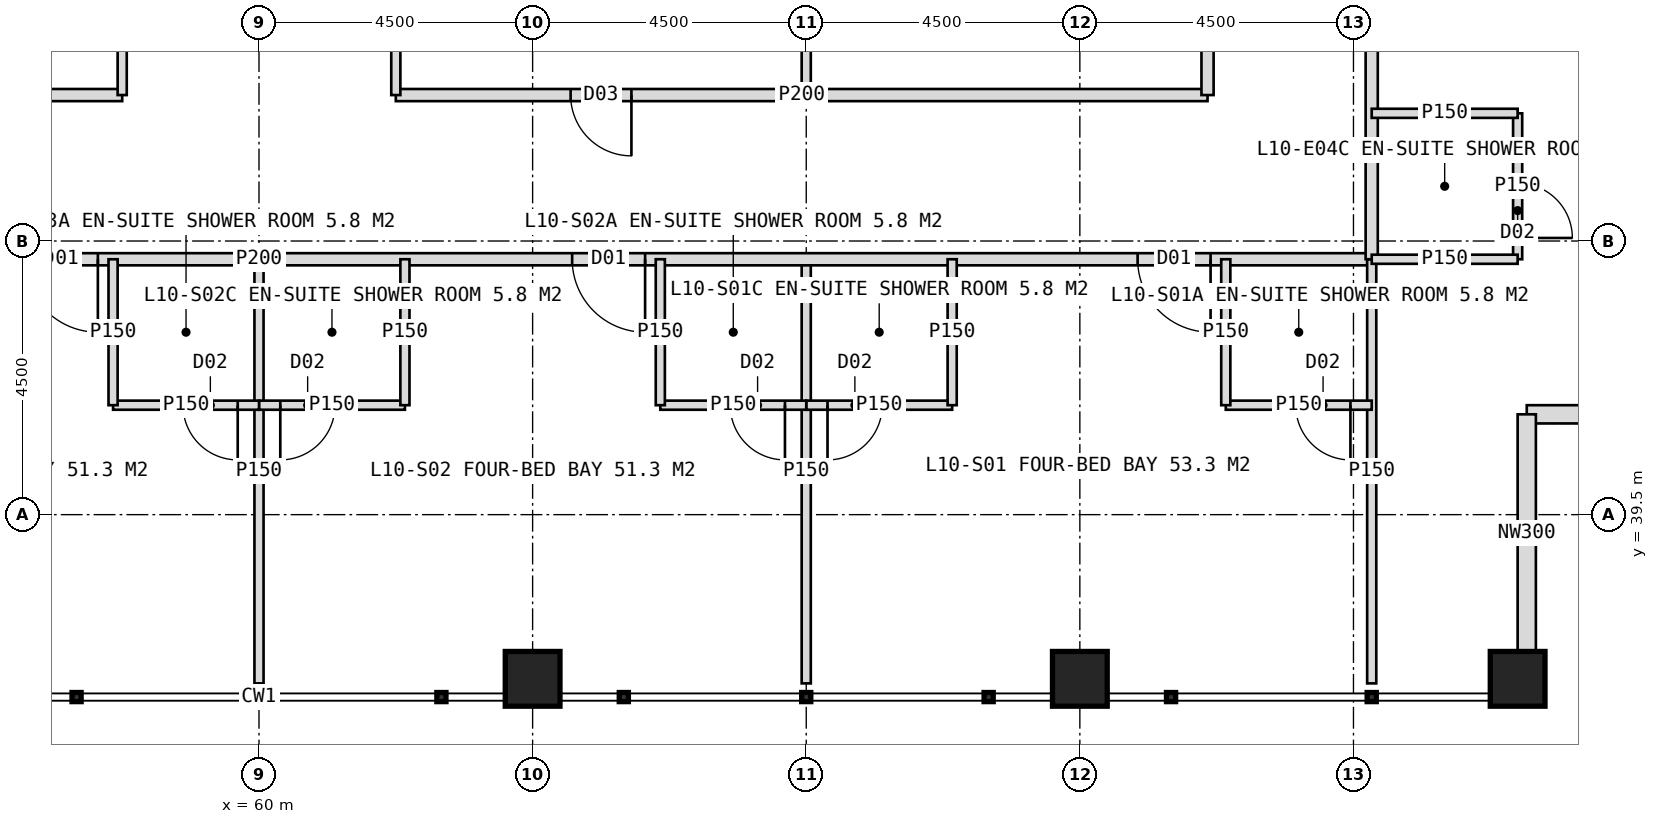
"""IFC4 building model, lengths in metres.
Left out: names, types, materials, properties, quantities, classifications, styles, units other than length and angle.
Written with IfcOpenShell. Run it as: python <this file> out.ifc"""

import sys

from ifc_helpers import new_model, si_unit, direction, frame, frame_2d, origin, origin_2d, place, context, subcontext, project, spatial, rectangle, hollow_rectangle, extrude, element, fill, save


model = new_model("IFC4")
c1 = context("Model", 3, precision=1e-05, world=origin(), true_north=direction((0.0, 1.0)))
c2 = subcontext(c1, "Body", "Model", "MODEL_VIEW")
j1 = project(units=[si_unit("LENGTHUNIT", "METRE"), si_unit("PLANEANGLEUNIT", "RADIAN")], contexts=[c1])
p1 = place(None, origin())
s1 = spatial("IfcSite", under=j1, at=p1, CompositionType="ELEMENT")
p2 = place(p1, origin())
s2 = spatial("IfcBuilding", under=s1, at=p2, CompositionType="ELEMENT")
p3 = place(p2, frame((0.0, 0.0, 47.0)))
s3 = spatial("IfcBuildingStorey", under=s2, at=p3, CompositionType="ELEMENT", Elevation=47.0)
for number, where, z_axis, x_axis in (
    (1, (64.5, 36.8, 0.0), (0.0, 0.0, 1.0), (1.0, 0.0, 0.0)),
    (2, (73.5, 36.8, 0.0), (0.0, 0.0, 1.0), (1.0, 0.0, 0.0)),
    (3, (80.7, 36.8, 0.0), (0.0, 0.0, 1.0), (1.0, 0.0, 0.0)),
):
    element("IfcColumn", number, at=place(p3, frame(where, z_axis=z_axis, x_axis=x_axis)), inside=s3, PredefinedType="COLUMN", context=c2, shape_type="SweptSolid", body=[
        extrude(hollow_rectangle(XDim=0.9, YDim=0.9, WallThickness=0.08, at=origin_2d()), origin(), (0.0, 0.0, 1.0), 4.0),
    ])
for number, where, z_axis, x_axis in (
    (4, (84.75, 41.15, 0.0), (0.0, 0.0, 1.0), (-1.0, 0.0, 0.0)),
    (5, (80.85, 41.15, 0.0), (0.0, 0.0, 1.0), (0.0, -1.0, 0.0)),
):
    element("IfcWall", number, at=place(p3, frame(where, z_axis=z_axis, x_axis=x_axis)), inside=s3, PredefinedType="ELEMENTEDWALL", context=c2, shape_type="SweptSolid", body=[
        extrude(rectangle(XDim=3.9, YDim=0.3, at=frame_2d((1.95, 0.0))), origin(), (0.0, 0.0, 1.0), 2.95),
    ])
p4 = place(p3, frame((69.0, 43.7, 0.0), z_axis=(0.0, 0.0, 1.0), x_axis=(0.0, -1.0, 0.0)))
e6 = element("IfcWall", 6, at=p4, inside=s3, PredefinedType="PARTITIONING", context=c2, shape_type="SweptSolid", body=[
    extrude(rectangle(XDim=6.975, YDim=0.15, at=frame_2d((3.487, 0.0))), origin(), (0.0, 0.0, 1.0), 3.75),
])
p5 = place(p3, frame((60.0, 43.7, 0.0), z_axis=(0.0, 0.0, 1.0), x_axis=(0.0, -1.0, 0.0)))
e7 = element("IfcWall", 7, at=p5, inside=s3, PredefinedType="PARTITIONING", context=c2, shape_type="SweptSolid", body=[
    extrude(rectangle(XDim=6.975, YDim=0.15, at=frame_2d((3.487, 0.0))), origin(), (0.0, 0.0, 1.0), 2.75),
])
p6 = place(p3, frame((78.3, 43.7, 0.0), z_axis=(0.0, 0.0, 1.0), x_axis=(-1.0, 0.0, 0.0)))
e8 = element("IfcWall", 8, at=p6, inside=s3, PredefinedType="PARTITIONING", context=c2, shape_type="SweptSolid", body=[
    extrude(rectangle(XDim=36.6, YDim=0.2, at=frame_2d((18.3, 0.0))), origin(), (0.0, 0.0, 1.0), 3.75),
])
p7 = place(p6, frame((2.65, 0.0, 0.0)))
e9 = element("IfcOpeningElement", 9, at=p7, cuts=e8, PredefinedType="OPENING", context=c2, shape_type="SweptSolid", body=[
    extrude(rectangle(XDim=1.2, YDim=2.2, at=frame_2d((0.6, 1.1))), frame((0.0, 0.11, 0.0), z_axis=(0.0, -1.0, 0.0), x_axis=(1.0, 0.0, 0.0)), (0.0, 0.0, 1.0), 0.22),
])
p8 = place(p6, frame((11.95, 0.0, 0.0)))
e10 = element("IfcOpeningElement", 10, at=p8, cuts=e8, PredefinedType="OPENING", context=c2, shape_type="SweptSolid", body=[
    extrude(rectangle(XDim=1.2, YDim=2.2, at=frame_2d((0.6, 1.1))), frame((0.0, 0.11, 0.0), z_axis=(0.0, -1.0, 0.0), x_axis=(1.0, 0.0, 0.0)), (0.0, 0.0, 1.0), 0.22),
])
p9 = place(p6, frame((20.95, 0.0, 0.0)))
e11 = element("IfcOpeningElement", 11, at=p9, cuts=e8, PredefinedType="OPENING", context=c2, shape_type="SweptSolid", body=[
    extrude(rectangle(XDim=1.2, YDim=2.2, at=frame_2d((0.6, 1.1))), frame((0.0, 0.11, 0.0), z_axis=(0.0, -1.0, 0.0), x_axis=(1.0, 0.0, 0.0)), (0.0, 0.0, 1.0), 0.22),
])
p10 = place(p6, frame((29.95, 0.0, 0.0)))
e12 = element("IfcOpeningElement", 12, at=p10, cuts=e8, PredefinedType="OPENING", context=c2, shape_type="SweptSolid", body=[
    extrude(rectangle(XDim=1.2, YDim=2.2, at=frame_2d((0.6, 1.1))), frame((0.0, 0.11, 0.0), z_axis=(0.0, -1.0, 0.0), x_axis=(1.0, 0.0, 0.0)), (0.0, 0.0, 1.0), 0.22),
])
p11 = place(p3, frame((78.3, 43.7, 0.0), z_axis=(0.0, 0.0, 1.0), x_axis=(0.0, -1.0, 0.0)))
e13 = element("IfcWall", 13, at=p11, inside=s3, PredefinedType="PARTITIONING", context=c2, shape_type="SweptSolid", body=[
    extrude(rectangle(XDim=6.975, YDim=0.15, at=frame_2d((3.487, 0.0))), origin(), (0.0, 0.0, 1.0), 3.75),
])
p12 = place(p3, frame((78.3, 41.3, 0.0), z_axis=(0.0, 0.0, 1.0), x_axis=(-1.0, 0.0, 0.0)))
e14 = element("IfcWall", 14, at=p12, inside=s3, PredefinedType="PARTITIONING", context=c2, shape_type="SweptSolid", body=[
    extrude(rectangle(XDim=2.4, YDim=0.15, at=frame_2d((1.2, 0.0))), origin(), (0.0, 0.0, 1.0), 2.95),
])
p13 = place(p12, frame((0.35, 0.0, 0.0)))
e15 = element("IfcOpeningElement", 15, at=p13, cuts=e14, PredefinedType="OPENING", context=c2, shape_type="SweptSolid", body=[
    extrude(rectangle(XDim=0.9, YDim=2.1, at=frame_2d((0.45, 1.05))), frame((0.0, 0.085, 0.0), z_axis=(0.0, -1.0, 0.0), x_axis=(1.0, 0.0, 0.0)), (0.0, 0.0, 1.0), 0.17),
])
p14 = place(p3, frame((75.9, 43.7, 0.0), z_axis=(0.0, 0.0, 1.0), x_axis=(0.0, -1.0, 0.0)))
e16 = element("IfcWall", 16, at=p14, inside=s3, PredefinedType="PARTITIONING", context=c2, shape_type="SweptSolid", body=[
    extrude(rectangle(XDim=2.4, YDim=0.15, at=frame_2d((1.2, 0.0))), origin(), (0.0, 0.0, 1.0), 3.75),
])
p15 = place(p3, frame((71.4, 41.3, 0.0), z_axis=(0.0, 0.0, 1.0), x_axis=(-1.0, 0.0, 0.0)))
e17 = element("IfcWall", 17, at=p15, inside=s3, PredefinedType="PARTITIONING", context=c2, shape_type="SweptSolid", body=[
    extrude(rectangle(XDim=2.4, YDim=0.15, at=frame_2d((1.2, 0.0))), origin(), (0.0, 0.0, 1.0), 3.75),
])
p16 = place(p15, frame((1.15, 0.0, 0.0)))
e18 = element("IfcOpeningElement", 18, at=p16, cuts=e17, PredefinedType="OPENING", context=c2, shape_type="SweptSolid", body=[
    extrude(rectangle(XDim=0.9, YDim=2.1, at=frame_2d((0.45, 1.05))), frame((0.0, 0.085, 0.0), z_axis=(0.0, -1.0, 0.0), x_axis=(1.0, 0.0, 0.0)), (0.0, 0.0, 1.0), 0.17),
])
p17 = place(p3, frame((71.4, 43.7, 0.0), z_axis=(0.0, 0.0, 1.0), x_axis=(0.0, -1.0, 0.0)))
e19 = element("IfcWall", 19, at=p17, inside=s3, PredefinedType="PARTITIONING", context=c2, shape_type="SweptSolid", body=[
    extrude(rectangle(XDim=2.4, YDim=0.15, at=frame_2d((1.2, 0.0))), origin(), (0.0, 0.0, 1.0), 3.75),
])
p18 = place(p3, frame((69.0, 41.3, 0.0), z_axis=(0.0, 0.0, 1.0), x_axis=(-1.0, 0.0, 0.0)))
e20 = element("IfcWall", 20, at=p18, inside=s3, PredefinedType="PARTITIONING", context=c2, shape_type="SweptSolid", body=[
    extrude(rectangle(XDim=2.4, YDim=0.15, at=frame_2d((1.2, 0.0))), origin(), (0.0, 0.0, 1.0), 3.75),
])
p19 = place(p18, frame((0.35, 0.0, 0.0)))
e21 = element("IfcOpeningElement", 21, at=p19, cuts=e20, PredefinedType="OPENING", context=c2, shape_type="SweptSolid", body=[
    extrude(rectangle(XDim=0.9, YDim=2.1, at=frame_2d((0.45, 1.05))), frame((0.0, 0.085, 0.0), z_axis=(0.0, -1.0, 0.0), x_axis=(1.0, 0.0, 0.0)), (0.0, 0.0, 1.0), 0.17),
])
p20 = place(p3, frame((66.6, 43.7, 0.0), z_axis=(0.0, 0.0, 1.0), x_axis=(0.0, -1.0, 0.0)))
e22 = element("IfcWall", 22, at=p20, inside=s3, PredefinedType="PARTITIONING", context=c2, shape_type="SweptSolid", body=[
    extrude(rectangle(XDim=2.4, YDim=0.15, at=frame_2d((1.2, 0.0))), origin(), (0.0, 0.0, 1.0), 3.75),
])
p21 = place(p3, frame((62.4, 41.3, 0.0), z_axis=(0.0, 0.0, 1.0), x_axis=(-1.0, 0.0, 0.0)))
e23 = element("IfcWall", 23, at=p21, inside=s3, PredefinedType="PARTITIONING", context=c2, shape_type="SweptSolid", body=[
    extrude(rectangle(XDim=2.4, YDim=0.15, at=frame_2d((1.2, 0.0))), origin(), (0.0, 0.0, 1.0), 3.75),
])
p22 = place(p21, frame((1.15, 0.0, 0.0)))
e24 = element("IfcOpeningElement", 24, at=p22, cuts=e23, PredefinedType="OPENING", context=c2, shape_type="SweptSolid", body=[
    extrude(rectangle(XDim=0.9, YDim=2.1, at=frame_2d((0.45, 1.05))), frame((0.0, 0.085, 0.0), z_axis=(0.0, -1.0, 0.0), x_axis=(1.0, 0.0, 0.0)), (0.0, 0.0, 1.0), 0.17),
])
p23 = place(p3, frame((62.4, 43.7, 0.0), z_axis=(0.0, 0.0, 1.0), x_axis=(0.0, -1.0, 0.0)))
e25 = element("IfcWall", 25, at=p23, inside=s3, PredefinedType="PARTITIONING", context=c2, shape_type="SweptSolid", body=[
    extrude(rectangle(XDim=2.4, YDim=0.15, at=frame_2d((1.2, 0.0))), origin(), (0.0, 0.0, 1.0), 3.75),
])
p24 = place(p3, frame((60.0, 41.3, 0.0), z_axis=(0.0, 0.0, 1.0), x_axis=(-1.0, 0.0, 0.0)))
e26 = element("IfcWall", 26, at=p24, inside=s3, PredefinedType="PARTITIONING", context=c2, shape_type="SweptSolid", body=[
    extrude(rectangle(XDim=2.4, YDim=0.15, at=frame_2d((1.2, 0.0))), origin(), (0.0, 0.0, 1.0), 3.75),
])
p25 = place(p24, frame((0.35, 0.0, 0.0)))
e27 = element("IfcOpeningElement", 27, at=p25, cuts=e26, PredefinedType="OPENING", context=c2, shape_type="SweptSolid", body=[
    extrude(rectangle(XDim=0.9, YDim=2.1, at=frame_2d((0.45, 1.05))), frame((0.0, 0.085, 0.0), z_axis=(0.0, -1.0, 0.0), x_axis=(1.0, 0.0, 0.0)), (0.0, 0.0, 1.0), 0.17),
])
p26 = place(p3, frame((57.6, 43.7, 0.0), z_axis=(0.0, 0.0, 1.0), x_axis=(0.0, -1.0, 0.0)))
e28 = element("IfcWall", 28, at=p26, inside=s3, PredefinedType="PARTITIONING", context=c2, shape_type="SweptSolid", body=[
    extrude(rectangle(XDim=2.4, YDim=0.15, at=frame_2d((1.2, 0.0))), origin(), (0.0, 0.0, 1.0), 3.75),
])
p27 = place(p3, frame((69.0, 53.0, 0.0), z_axis=(0.0, 0.0, 1.0), x_axis=(0.0, -1.0, 0.0)))
e29 = element("IfcWall", 29, at=p27, inside=s3, PredefinedType="PARTITIONING", context=c2, shape_type="SweptSolid", body=[
    extrude(rectangle(XDim=6.6, YDim=0.15, at=frame_2d((3.3, 0.0))), origin(), (0.0, 0.0, 1.0), 3.75),
])
p28 = place(p3, frame((75.6, 46.4, 0.0), z_axis=(0.0, 0.0, 1.0), x_axis=(-1.0, 0.0, 0.0)))
e30 = element("IfcWall", 30, at=p28, inside=s3, PredefinedType="PARTITIONING", context=c2, shape_type="SweptSolid", body=[
    extrude(rectangle(XDim=13.35, YDim=0.2, at=frame_2d((6.675, 0.0))), origin(), (0.0, 0.0, 1.0), 3.75),
])
p29 = place(p28, frame((9.475, 0.0, 0.0)))
e31 = element("IfcOpeningElement", 31, at=p29, cuts=e30, PredefinedType="OPENING", context=c2, shape_type="SweptSolid", body=[
    extrude(rectangle(XDim=1.0, YDim=2.1, at=frame_2d((0.5, 1.05))), frame((0.0, 0.11, 0.0), z_axis=(0.0, -1.0, 0.0), x_axis=(1.0, 0.0, 0.0)), (0.0, 0.0, 1.0), 0.22),
])
p30 = place(p3, frame((57.75, 46.4, 0.0), z_axis=(0.0, 0.0, 1.0), x_axis=(-1.0, 0.0, 0.0)))
e32 = element("IfcWall", 32, at=p30, inside=s3, PredefinedType="PARTITIONING", context=c2, shape_type="SweptSolid", body=[
    extrude(rectangle(XDim=13.35, YDim=0.2, at=frame_2d((6.675, 0.0))), origin(), (0.0, 0.0, 1.0), 3.75),
])
p31 = place(p30, frame((2.875, 0.0, 0.0)))
e33 = element("IfcOpeningElement", 33, at=p31, cuts=e32, PredefinedType="OPENING", context=c2, shape_type="SweptSolid", body=[
    extrude(rectangle(XDim=1.0, YDim=2.1, at=frame_2d((0.5, 1.05))), frame((0.0, 0.11, 0.0), z_axis=(0.0, -1.0, 0.0), x_axis=(1.0, 0.0, 0.0)), (0.0, 0.0, 1.0), 0.22),
])
p32 = place(p30, frame((9.55, 0.0, 0.0)))
e34 = element("IfcOpeningElement", 34, at=p32, cuts=e32, PredefinedType="OPENING", context=c2, shape_type="SweptSolid", body=[
    extrude(rectangle(XDim=1.0, YDim=2.1, at=frame_2d((0.5, 1.05))), frame((0.0, 0.11, 0.0), z_axis=(0.0, -1.0, 0.0), x_axis=(1.0, 0.0, 0.0)), (0.0, 0.0, 1.0), 0.22),
])
for number, where, z_axis, x_axis in (
    (35, (62.25, 53.0, 0.0), (0.0, 0.0, 1.0), (0.0, -1.0, 0.0)),
    (36, (57.75, 53.0, 0.0), (0.0, 0.0, 1.0), (0.0, -1.0, 0.0)),
):
    element("IfcWall", number, at=place(p3, frame(where, z_axis=z_axis, x_axis=x_axis)), inside=s3, PredefinedType="PARTITIONING", context=c2, shape_type="SweptSolid", body=[
        extrude(rectangle(XDim=6.6, YDim=0.15, at=frame_2d((3.3, 0.0))), origin(), (0.0, 0.0, 1.0), 3.75),
    ])
p33 = place(p3, frame((78.3, 80.3, 0.0), z_axis=(0.0, 0.0, 1.0), x_axis=(0.0, -1.0, 0.0)))
e37 = element("IfcWall", 37, at=p33, inside=s3, PredefinedType="PARTITIONING", context=c2, shape_type="SweptSolid", body=[
    extrude(rectangle(XDim=36.6, YDim=0.2, at=frame_2d((18.3, 0.0))), origin(), (0.0, 0.0, 1.0), 3.75),
])
p34 = place(p33, frame((2.65, 0.0, 0.0)))
e38 = element("IfcOpeningElement", 38, at=p34, cuts=e37, PredefinedType="OPENING", context=c2, shape_type="SweptSolid", body=[
    extrude(rectangle(XDim=1.2, YDim=2.2, at=frame_2d((0.6, 1.1))), frame((0.0, 0.11, 0.0), z_axis=(0.0, -1.0, 0.0), x_axis=(1.0, 0.0, 0.0)), (0.0, 0.0, 1.0), 0.22),
])
p35 = place(p33, frame((11.95, 0.0, 0.0)))
e39 = element("IfcOpeningElement", 39, at=p35, cuts=e37, PredefinedType="OPENING", context=c2, shape_type="SweptSolid", body=[
    extrude(rectangle(XDim=1.2, YDim=2.2, at=frame_2d((0.6, 1.1))), frame((0.0, 0.11, 0.0), z_axis=(0.0, -1.0, 0.0), x_axis=(1.0, 0.0, 0.0)), (0.0, 0.0, 1.0), 0.22),
])
p36 = place(p33, frame((20.95, 0.0, 0.0)))
e40 = element("IfcOpeningElement", 40, at=p36, cuts=e37, PredefinedType="OPENING", context=c2, shape_type="SweptSolid", body=[
    extrude(rectangle(XDim=1.2, YDim=2.2, at=frame_2d((0.6, 1.1))), frame((0.0, 0.11, 0.0), z_axis=(0.0, -1.0, 0.0), x_axis=(1.0, 0.0, 0.0)), (0.0, 0.0, 1.0), 0.22),
])
p37 = place(p33, frame((29.95, 0.0, 0.0)))
e41 = element("IfcOpeningElement", 41, at=p37, cuts=e37, PredefinedType="OPENING", context=c2, shape_type="SweptSolid", body=[
    extrude(rectangle(XDim=1.2, YDim=2.2, at=frame_2d((0.6, 1.1))), frame((0.0, 0.11, 0.0), z_axis=(0.0, -1.0, 0.0), x_axis=(1.0, 0.0, 0.0)), (0.0, 0.0, 1.0), 0.22),
])
p38 = place(p3, frame((80.7, 46.1, 0.0), z_axis=(0.0, 0.0, 1.0), x_axis=(0.0, -1.0, 0.0)))
e42 = element("IfcWall", 42, at=p38, inside=s3, PredefinedType="PARTITIONING", context=c2, shape_type="SweptSolid", body=[
    extrude(rectangle(XDim=2.4, YDim=0.15, at=frame_2d((1.2, 0.0))), origin(), (0.0, 0.0, 1.0), 2.95),
])
p39 = place(p38, frame((1.15, 0.0, 0.0)))
e43 = element("IfcOpeningElement", 43, at=p39, cuts=e42, PredefinedType="OPENING", context=c2, shape_type="SweptSolid", body=[
    extrude(rectangle(XDim=0.9, YDim=2.1, at=frame_2d((0.45, 1.05))), frame((0.0, 0.085, 0.0), z_axis=(0.0, -1.0, 0.0), x_axis=(1.0, 0.0, 0.0)), (0.0, 0.0, 1.0), 0.17),
])
for number, where, z_axis, x_axis in (
    (44, (78.3, 46.1, 0.0), (0.0, 0.0, 1.0), (1.0, 0.0, 0.0)),
    (45, (78.3, 43.7, 0.0), (0.0, 0.0, 1.0), (1.0, 0.0, 0.0)),
):
    element("IfcWall", number, at=place(p3, frame(where, z_axis=z_axis, x_axis=x_axis)), inside=s3, PredefinedType="PARTITIONING", context=c2, shape_type="SweptSolid", body=[
        extrude(rectangle(XDim=2.4, YDim=0.15, at=frame_2d((1.2, 0.0))), origin(), (0.0, 0.0, 1.0), 3.75),
    ])
p40 = place(p3, frame((75.6, 62.0, 0.0), z_axis=(0.0, 0.0, 1.0), x_axis=(0.0, -1.0, 0.0)))
e46 = element("IfcWall", 46, at=p40, inside=s3, PredefinedType="PARTITIONING", context=c2, shape_type="SweptSolid", body=[
    extrude(rectangle(XDim=15.6, YDim=0.2, at=frame_2d((7.8, 0.0))), origin(), (0.0, 0.0, 1.0), 3.75),
])
p41 = place(p40, frame((4.0, 0.0, 0.0)))
e47 = element("IfcOpeningElement", 47, at=p41, cuts=e46, PredefinedType="OPENING", context=c2, shape_type="SweptSolid", body=[
    extrude(rectangle(XDim=1.0, YDim=2.1, at=frame_2d((0.5, 1.05))), frame((0.0, 0.11, 0.0), z_axis=(0.0, -1.0, 0.0), x_axis=(1.0, 0.0, 0.0)), (0.0, 0.0, 1.0), 0.22),
])
p42 = place(p40, frame((11.8, 0.0, 0.0)))
e48 = element("IfcOpeningElement", 48, at=p42, cuts=e46, PredefinedType="OPENING", context=c2, shape_type="SweptSolid", body=[
    extrude(rectangle(XDim=1.0, YDim=2.1, at=frame_2d((0.5, 1.05))), frame((0.0, 0.11, 0.0), z_axis=(0.0, -1.0, 0.0), x_axis=(1.0, 0.0, 0.0)), (0.0, 0.0, 1.0), 0.22),
])
p43 = place(p7, origin())
e49 = element("IfcDoor", 49, at=p43, inside=s3, OperationType="SINGLE_SWING_LEFT", PredefinedType="DOOR", context=c2, shape_type="SweptSolid", body=[
    extrude(rectangle(XDim=1.2, YDim=2.2, at=frame_2d((0.6, 1.1))), frame((0.0, 0.025, 0.0), z_axis=(0.0, -1.0, 0.0), x_axis=(1.0, 0.0, 0.0)), (0.0, 0.0, 1.0), 0.05),
])
fill(e9, e49)
p44 = place(p13, origin())
e50 = element("IfcDoor", 50, at=p44, inside=s3, OperationType="SINGLE_SWING_LEFT", PredefinedType="DOOR", context=c2, shape_type="SweptSolid", body=[
    extrude(rectangle(XDim=0.9, YDim=2.1, at=frame_2d((0.45, 1.05))), frame((0.0, 0.025, 0.0), z_axis=(0.0, -1.0, 0.0), x_axis=(1.0, 0.0, 0.0)), (0.0, 0.0, 1.0), 0.05),
])
fill(e15, e50)
p45 = place(p16, origin())
e51 = element("IfcDoor", 51, at=p45, inside=s3, OperationType="SINGLE_SWING_RIGHT", PredefinedType="DOOR", context=c2, shape_type="SweptSolid", body=[
    extrude(rectangle(XDim=0.9, YDim=2.1, at=frame_2d((0.45, 1.05))), frame((0.0, 0.025, 0.0), z_axis=(0.0, -1.0, 0.0), x_axis=(1.0, 0.0, 0.0)), (0.0, 0.0, 1.0), 0.05),
])
fill(e18, e51)
p46 = place(p8, origin())
e52 = element("IfcDoor", 52, at=p46, inside=s3, OperationType="SINGLE_SWING_LEFT", PredefinedType="DOOR", context=c2, shape_type="SweptSolid", body=[
    extrude(rectangle(XDim=1.2, YDim=2.2, at=frame_2d((0.6, 1.1))), frame((0.0, 0.025, 0.0), z_axis=(0.0, -1.0, 0.0), x_axis=(1.0, 0.0, 0.0)), (0.0, 0.0, 1.0), 0.05),
])
fill(e10, e52)
p47 = place(p19, origin())
e53 = element("IfcDoor", 53, at=p47, inside=s3, OperationType="SINGLE_SWING_LEFT", PredefinedType="DOOR", context=c2, shape_type="SweptSolid", body=[
    extrude(rectangle(XDim=0.9, YDim=2.1, at=frame_2d((0.45, 1.05))), frame((0.0, 0.025, 0.0), z_axis=(0.0, -1.0, 0.0), x_axis=(1.0, 0.0, 0.0)), (0.0, 0.0, 1.0), 0.05),
])
fill(e21, e53)
p48 = place(p22, origin())
e54 = element("IfcDoor", 54, at=p48, inside=s3, OperationType="SINGLE_SWING_RIGHT", PredefinedType="DOOR", context=c2, shape_type="SweptSolid", body=[
    extrude(rectangle(XDim=0.9, YDim=2.1, at=frame_2d((0.45, 1.05))), frame((0.0, 0.025, 0.0), z_axis=(0.0, -1.0, 0.0), x_axis=(1.0, 0.0, 0.0)), (0.0, 0.0, 1.0), 0.05),
])
fill(e24, e54)
p49 = place(p9, origin())
e55 = element("IfcDoor", 55, at=p49, inside=s3, OperationType="SINGLE_SWING_LEFT", PredefinedType="DOOR", context=c2, shape_type="SweptSolid", body=[
    extrude(rectangle(XDim=1.2, YDim=2.2, at=frame_2d((0.6, 1.1))), frame((0.0, 0.025, 0.0), z_axis=(0.0, -1.0, 0.0), x_axis=(1.0, 0.0, 0.0)), (0.0, 0.0, 1.0), 0.05),
])
fill(e11, e55)
p50 = place(p25, origin())
e56 = element("IfcDoor", 56, at=p50, inside=s3, OperationType="SINGLE_SWING_LEFT", PredefinedType="DOOR", context=c2, shape_type="SweptSolid", body=[
    extrude(rectangle(XDim=0.9, YDim=2.1, at=frame_2d((0.45, 1.05))), frame((0.0, 0.025, 0.0), z_axis=(0.0, -1.0, 0.0), x_axis=(1.0, 0.0, 0.0)), (0.0, 0.0, 1.0), 0.05),
])
fill(e27, e56)
p51 = place(p29, origin())
e57 = element("IfcDoor", 57, at=p51, inside=s3, OperationType="SINGLE_SWING_LEFT", PredefinedType="DOOR", context=c2, shape_type="SweptSolid", body=[
    extrude(rectangle(XDim=1.0, YDim=2.1, at=frame_2d((0.5, 1.05))), frame((0.0, 0.025, 0.0), z_axis=(0.0, -1.0, 0.0), x_axis=(1.0, 0.0, 0.0)), (0.0, 0.0, 1.0), 0.05),
])
fill(e31, e57)
p52 = place(p39, origin())
e58 = element("IfcDoor", 58, at=p52, inside=s3, OperationType="SINGLE_SWING_RIGHT", PredefinedType="DOOR", context=c2, shape_type="SweptSolid", body=[
    extrude(rectangle(XDim=0.9, YDim=2.1, at=frame_2d((0.45, 1.05))), frame((0.0, 0.025, 0.0), z_axis=(0.0, -1.0, 0.0), x_axis=(1.0, 0.0, 0.0)), (0.0, 0.0, 1.0), 0.05),
])
fill(e43, e58)
save(model, sys.argv[1])
